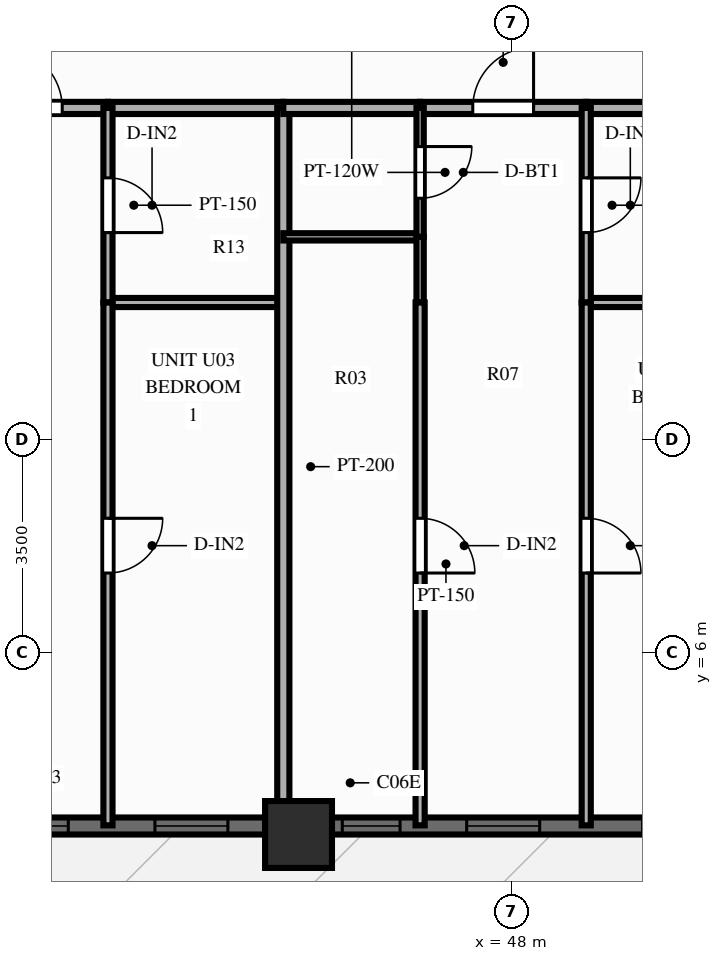
"""IFC4 building model, lengths in metres.
Left out: names, types, materials, properties, quantities, classifications, styles, units other than length and angle.
Written with IfcOpenShell. Run it as: python <this file> out.ifc"""

import sys

from ifc_helpers import new_model, si_unit, direction, frame, frame_2d, origin, origin_2d, place, context, subcontext, project, spatial, rectangle, extrude, source, transform, mapped, element, fill, save


model = new_model("IFC4")
c1 = context("Model", 3, precision=1e-05, world=origin(), true_north=direction((0.0, 1.0)))
c2 = subcontext(c1, "Body", "Model", "MODEL_VIEW")
j1 = project(units=[si_unit("LENGTHUNIT", "METRE"), si_unit("PLANEANGLEUNIT", "RADIAN")], contexts=[c1])
p1 = place(None, origin())
s1 = spatial("IfcSite", under=j1, at=p1, CompositionType="ELEMENT")
p2 = place(p1, origin())
s2 = spatial("IfcBuilding", under=s1, at=p2, CompositionType="ELEMENT")
p3 = place(p2, frame((0.0, 0.0, 61.4)))
s3 = spatial("IfcBuildingStorey", under=s2, at=p3, CompositionType="ELEMENT", Elevation=61.4)
m1 = source(origin(), c2, "Body", "SweptSolid", [
    extrude(rectangle(XDim=1.1, YDim=1.1, at=origin_2d()), origin(), (0.0, 0.0, 1.0), 3.0),
])
p4 = place(p3, frame((44.5, 3.0, 0.0), z_axis=(0.0, 0.0, 1.0), x_axis=(1.0, 0.0, 0.0)))
e1 = element("IfcColumn", 1, at=p4, inside=s3, PredefinedType="COLUMN", context=c2, shape_type="MappedRepresentation", body=[
    mapped(m1, transform((0.0, 0.0, 0.0), scale=1.0)),
])
p5 = place(p3, frame((15.5, 3.14, 0.0), z_axis=(0.0, 0.0, 1.0), x_axis=(1.0, 0.0, 0.0)))
e2 = element("IfcWall", 2, at=p5, inside=s3, PredefinedType="SOLIDWALL", context=c2, shape_type="SweptSolid", body=[
    extrude(rectangle(XDim=45.0, YDim=0.28, at=frame_2d((22.5, 0.0))), origin(), (0.0, 0.0, 1.0), 2.28),
])
p6 = place(p5, frame((1.426, 0.0, 0.25)))
e3 = element("IfcOpeningElement", 3, at=p6, cuts=e2, PredefinedType="OPENING", context=c2, shape_type="SweptSolid", body=[
    extrude(rectangle(XDim=1.2, YDim=1.5, at=frame_2d((0.6, 0.75))), frame((0.0, 0.152, 0.0), z_axis=(0.0, -1.0, 0.0), x_axis=(1.0, 0.0, 0.0)), (0.0, 0.0, 1.0), 0.304),
])
p7 = place(p5, frame((7.278, 0.0, 0.0), z_axis=(0.0, 0.0, 1.0), x_axis=(-1.0, 0.0, 0.0)))
e4 = element("IfcOpeningElement", 4, at=p7, cuts=e2, PredefinedType="OPENING", context=c2, shape_type="SweptSolid", body=[
    extrude(rectangle(XDim=1.1, YDim=2.15, at=frame_2d((0.55, 1.075))), frame((0.0, 0.152, 0.0), z_axis=(0.0, -1.0, 0.0), x_axis=(1.0, 0.0, 0.0)), (0.0, 0.0, 1.0), 0.304),
])
p8 = place(p5, frame((11.083, 0.0, 0.25)))
e5 = element("IfcOpeningElement", 5, at=p8, cuts=e2, PredefinedType="OPENING", context=c2, shape_type="SweptSolid", body=[
    extrude(rectangle(XDim=1.2, YDim=1.5, at=frame_2d((0.6, 0.75))), frame((0.0, 0.152, 0.0), z_axis=(0.0, -1.0, 0.0), x_axis=(1.0, 0.0, 0.0)), (0.0, 0.0, 1.0), 0.304),
])
p9 = place(p5, frame((13.991, 0.0, 0.25)))
e6 = element("IfcOpeningElement", 6, at=p9, cuts=e2, PredefinedType="OPENING", context=c2, shape_type="SweptSolid", body=[
    extrude(rectangle(XDim=1.2, YDim=1.5, at=frame_2d((0.6, 0.75))), frame((0.0, 0.152, 0.0), z_axis=(0.0, -1.0, 0.0), x_axis=(1.0, 0.0, 0.0)), (0.0, 0.0, 1.0), 0.304),
])
p10 = place(p5, frame((16.858, 0.0, 0.25)))
e7 = element("IfcOpeningElement", 7, at=p10, cuts=e2, PredefinedType="OPENING", context=c2, shape_type="SweptSolid", body=[
    extrude(rectangle(XDim=0.95, YDim=1.5, at=frame_2d((0.475, 0.75))), frame((0.0, 0.152, 0.0), z_axis=(0.0, -1.0, 0.0), x_axis=(1.0, 0.0, 0.0)), (0.0, 0.0, 1.0), 0.304),
])
p11 = place(p5, frame((19.119, 0.0, 0.25)))
e8 = element("IfcOpeningElement", 8, at=p11, cuts=e2, PredefinedType="OPENING", context=c2, shape_type="SweptSolid", body=[
    extrude(rectangle(XDim=1.2, YDim=1.5, at=frame_2d((0.6, 0.75))), frame((0.0, 0.152, 0.0), z_axis=(0.0, -1.0, 0.0), x_axis=(1.0, 0.0, 0.0)), (0.0, 0.0, 1.0), 0.304),
])
p12 = place(p5, frame((21.661, 0.0, 0.25)))
e9 = element("IfcOpeningElement", 9, at=p12, cuts=e2, PredefinedType="OPENING", context=c2, shape_type="SweptSolid", body=[
    extrude(rectangle(XDim=1.2, YDim=1.5, at=frame_2d((0.6, 0.75))), frame((0.0, 0.152, 0.0), z_axis=(0.0, -1.0, 0.0), x_axis=(1.0, 0.0, 0.0)), (0.0, 0.0, 1.0), 0.304),
])
p13 = place(p5, frame((24.013, 0.0, 0.25)))
e10 = element("IfcOpeningElement", 10, at=p13, cuts=e2, PredefinedType="OPENING", context=c2, shape_type="SweptSolid", body=[
    extrude(rectangle(XDim=1.2, YDim=1.5, at=frame_2d((0.6, 0.75))), frame((0.0, 0.152, 0.0), z_axis=(0.0, -1.0, 0.0), x_axis=(1.0, 0.0, 0.0)), (0.0, 0.0, 1.0), 0.304),
])
p14 = place(p5, frame((26.638, 0.0, 0.25)))
e11 = element("IfcOpeningElement", 11, at=p14, cuts=e2, PredefinedType="OPENING", context=c2, shape_type="SweptSolid", body=[
    extrude(rectangle(XDim=1.2, YDim=1.5, at=frame_2d((0.6, 0.75))), frame((0.0, 0.152, 0.0), z_axis=(0.0, -1.0, 0.0), x_axis=(1.0, 0.0, 0.0)), (0.0, 0.0, 1.0), 0.304),
])
p15 = place(p5, frame((29.72, 0.0, 0.25)))
e12 = element("IfcOpeningElement", 12, at=p15, cuts=e2, PredefinedType="OPENING", context=c2, shape_type="SweptSolid", body=[
    extrude(rectangle(XDim=0.95, YDim=1.5, at=frame_2d((0.475, 0.75))), frame((0.0, 0.152, 0.0), z_axis=(0.0, -1.0, 0.0), x_axis=(1.0, 0.0, 0.0)), (0.0, 0.0, 1.0), 0.304),
])
p16 = place(p5, frame((31.765, 0.0, 0.25)))
e13 = element("IfcOpeningElement", 13, at=p16, cuts=e2, PredefinedType="OPENING", context=c2, shape_type="SweptSolid", body=[
    extrude(rectangle(XDim=1.2, YDim=1.5, at=frame_2d((0.6, 0.75))), frame((0.0, 0.152, 0.0), z_axis=(0.0, -1.0, 0.0), x_axis=(1.0, 0.0, 0.0)), (0.0, 0.0, 1.0), 0.304),
])
p17 = place(p5, frame((34.658, 0.0, 0.25)))
e14 = element("IfcOpeningElement", 14, at=p17, cuts=e2, PredefinedType="OPENING", context=c2, shape_type="SweptSolid", body=[
    extrude(rectangle(XDim=1.2, YDim=1.5, at=frame_2d((0.6, 0.75))), frame((0.0, 0.152, 0.0), z_axis=(0.0, -1.0, 0.0), x_axis=(1.0, 0.0, 0.0)), (0.0, 0.0, 1.0), 0.304),
])
p18 = place(p5, frame((37.31, 0.0, 0.25)))
e15 = element("IfcOpeningElement", 15, at=p18, cuts=e2, PredefinedType="OPENING", context=c2, shape_type="SweptSolid", body=[
    extrude(rectangle(XDim=1.2, YDim=1.5, at=frame_2d((0.6, 0.75))), frame((0.0, 0.152, 0.0), z_axis=(0.0, -1.0, 0.0), x_axis=(1.0, 0.0, 0.0)), (0.0, 0.0, 1.0), 0.304),
])
p19 = place(p5, frame((39.801, 0.0, 0.25)))
e16 = element("IfcOpeningElement", 16, at=p19, cuts=e2, PredefinedType="OPENING", context=c2, shape_type="SweptSolid", body=[
    extrude(rectangle(XDim=1.2, YDim=1.5, at=frame_2d((0.6, 0.75))), frame((0.0, 0.152, 0.0), z_axis=(0.0, -1.0, 0.0), x_axis=(1.0, 0.0, 0.0)), (0.0, 0.0, 1.0), 0.304),
])
p20 = place(p5, frame((42.588, 0.0, 0.25)))
e17 = element("IfcOpeningElement", 17, at=p20, cuts=e2, PredefinedType="OPENING", context=c2, shape_type="SweptSolid", body=[
    extrude(rectangle(XDim=1.2, YDim=1.5, at=frame_2d((0.6, 0.75))), frame((0.0, 0.152, 0.0), z_axis=(0.0, -1.0, 0.0), x_axis=(1.0, 0.0, 0.0)), (0.0, 0.0, 1.0), 0.304),
])
p21 = place(p3, frame((38.861, 14.95, 0.0), z_axis=(0.0, 0.0, 1.0), x_axis=(1.0, 0.0, 0.0)))
e18 = element("IfcWall", 18, at=p21, inside=s3, PredefinedType="PARTITIONING", context=c2, shape_type="SweptSolid", body=[
    extrude(rectangle(XDim=2.505, YDim=0.2, at=frame_2d((1.252, 0.0))), origin(), (0.0, 0.0, 1.0), 2.79),
])
p22 = place(p21, frame((0.753, 0.0, 0.0)))
e19 = element("IfcOpeningElement", 19, at=p22, cuts=e18, PredefinedType="OPENING", context=c2, shape_type="SweptSolid", body=[
    extrude(rectangle(XDim=1.0, YDim=2.15, at=frame_2d((0.5, 1.075))), frame((0.0, 0.112, 0.0), z_axis=(0.0, -1.0, 0.0), x_axis=(1.0, 0.0, 0.0)), (0.0, 0.0, 1.0), 0.224),
])
p23 = place(p3, frame((41.366, 14.95, 0.0), z_axis=(0.0, 0.0, 1.0), x_axis=(1.0, 0.0, 0.0)))
e20 = element("IfcWall", 20, at=p23, inside=s3, PredefinedType="PARTITIONING", context=c2, shape_type="SweptSolid", body=[
    extrude(rectangle(XDim=2.884, YDim=0.2, at=frame_2d((1.442, 0.0))), origin(), (0.0, 0.0, 1.0), 2.79),
])
p24 = place(p3, frame((41.366, 11.75, 0.0), z_axis=(0.0, 0.0, 1.0), x_axis=(1.0, 0.0, 0.0)))
e21 = element("IfcWall", 21, at=p24, inside=s3, PredefinedType="PARTITIONING", context=c2, shape_type="SweptSolid", body=[
    extrude(rectangle(XDim=2.884, YDim=0.15, at=frame_2d((1.442, 0.0))), origin(), (0.0, 0.0, 1.0), 2.79),
])
p25 = place(p3, frame((41.366, 14.95, 0.0), z_axis=(0.0, 0.0, 1.0), x_axis=(0.0, -1.0, 0.0)))
e22 = element("IfcWall", 22, at=p25, inside=s3, PredefinedType="PARTITIONING", context=c2, shape_type="SweptSolid", body=[
    extrude(rectangle(XDim=3.2, YDim=0.15, at=frame_2d((1.6, 0.0))), origin(), (0.0, 0.0, 1.0), 2.79),
])
p26 = place(p25, frame((1.15, 0.0, 0.0)))
e23 = element("IfcOpeningElement", 23, at=p26, cuts=e22, PredefinedType="OPENING", context=c2, shape_type="SweptSolid", body=[
    extrude(rectangle(XDim=0.9, YDim=2.1, at=frame_2d((0.45, 1.05))), frame((0.0, 0.087, 0.0), z_axis=(0.0, -1.0, 0.0), x_axis=(1.0, 0.0, 0.0)), (0.0, 0.0, 1.0), 0.174),
])
p27 = place(p3, frame((41.366, 11.75, 0.0), z_axis=(0.0, 0.0, 1.0), x_axis=(0.0, -1.0, 0.0)))
e24 = element("IfcWall", 24, at=p27, inside=s3, PredefinedType="PARTITIONING", context=c2, shape_type="SweptSolid", body=[
    extrude(rectangle(XDim=8.6, YDim=0.15, at=frame_2d((4.3, 0.0))), origin(), (0.0, 0.0, 1.0), 2.79),
])
p28 = place(p27, frame((3.549, 0.0, 0.0)))
e25 = element("IfcOpeningElement", 25, at=p28, cuts=e24, PredefinedType="OPENING", context=c2, shape_type="SweptSolid", body=[
    extrude(rectangle(XDim=0.9, YDim=2.1, at=frame_2d((0.45, 1.05))), frame((0.0, 0.087, 0.0), z_axis=(0.0, -1.0, 0.0), x_axis=(1.0, 0.0, 0.0)), (0.0, 0.0, 1.0), 0.174),
])
p29 = place(p3, frame((44.25, 14.95, 0.0), z_axis=(0.0, 0.0, 1.0), x_axis=(0.0, -1.0, 0.0)))
e26 = element("IfcWall", 26, at=p29, inside=s3, PredefinedType="PARTITIONING", context=c2, shape_type="SweptSolid", body=[
    extrude(rectangle(XDim=11.8, YDim=0.2, at=frame_2d((5.9, 0.0))), origin(), (0.0, 0.0, 1.0), 2.79),
])
p30 = place(p3, frame((44.25, 14.95, 0.0), z_axis=(0.0, 0.0, 1.0), x_axis=(1.0, 0.0, 0.0)))
e27 = element("IfcWall", 27, at=p30, inside=s3, PredefinedType="PARTITIONING", context=c2, shape_type="SweptSolid", body=[
    extrude(rectangle(XDim=2.25, YDim=0.2, at=frame_2d((1.125, 0.0))), origin(), (0.0, 0.0, 1.0), 2.79),
])
p31 = place(p3, frame((46.5, 14.95, 0.0), z_axis=(0.0, 0.0, 1.0), x_axis=(1.0, 0.0, 0.0)))
e28 = element("IfcWall", 28, at=p31, inside=s3, PredefinedType="PARTITIONING", context=c2, shape_type="SweptSolid", body=[
    extrude(rectangle(XDim=2.732, YDim=0.2, at=frame_2d((1.366, 0.0))), origin(), (0.0, 0.0, 1.0), 2.79),
])
p32 = place(p31, frame((0.866, 0.0, 0.0)))
e29 = element("IfcOpeningElement", 29, at=p32, cuts=e28, PredefinedType="OPENING", context=c2, shape_type="SweptSolid", body=[
    extrude(rectangle(XDim=1.0, YDim=2.15, at=frame_2d((0.5, 1.075))), frame((0.0, 0.112, 0.0), z_axis=(0.0, -1.0, 0.0), x_axis=(1.0, 0.0, 0.0)), (0.0, 0.0, 1.0), 0.224),
])
p33 = place(p3, frame((49.231, 14.95, 0.0), z_axis=(0.0, 0.0, 1.0), x_axis=(1.0, 0.0, 0.0)))
e30 = element("IfcWall", 30, at=p33, inside=s3, PredefinedType="PARTITIONING", context=c2, shape_type="SweptSolid", body=[
    extrude(rectangle(XDim=3.053, YDim=0.2, at=frame_2d((1.527, 0.0))), origin(), (0.0, 0.0, 1.0), 2.79),
])
p34 = place(p3, frame((44.25, 12.83, 0.0), z_axis=(0.0, 0.0, 1.0), x_axis=(1.0, 0.0, 0.0)))
e31 = element("IfcWall", 31, at=p34, inside=s3, PredefinedType="PARTITIONING", context=c2, shape_type="SweptSolid", body=[
    extrude(rectangle(XDim=2.25, YDim=0.12, at=frame_2d((1.125, 0.0))), origin(), (0.0, 0.0, 1.0), 2.79),
])
p35 = place(p3, frame((49.231, 11.75, 0.0), z_axis=(0.0, 0.0, 1.0), x_axis=(1.0, 0.0, 0.0)))
e32 = element("IfcWall", 32, at=p35, inside=s3, PredefinedType="PARTITIONING", context=c2, shape_type="SweptSolid", body=[
    extrude(rectangle(XDim=3.053, YDim=0.15, at=frame_2d((1.527, 0.0))), origin(), (0.0, 0.0, 1.0), 2.79),
])
p36 = place(p3, frame((46.5, 14.95, 0.0), z_axis=(0.0, 0.0, 1.0), x_axis=(0.0, -1.0, 0.0)))
e33 = element("IfcWall", 33, at=p36, inside=s3, PredefinedType="PARTITIONING", context=c2, shape_type="SweptSolid", body=[
    extrude(rectangle(XDim=2.12, YDim=0.12, at=frame_2d((1.06, 0.0))), origin(), (0.0, 0.0, 1.0), 2.79),
])
p37 = place(p36, frame((0.635, 0.0, 0.0)))
e34 = element("IfcOpeningElement", 34, at=p37, cuts=e33, PredefinedType="OPENING", context=c2, shape_type="SweptSolid", body=[
    extrude(rectangle(XDim=0.85, YDim=2.05, at=frame_2d((0.425, 1.025))), frame((0.0, 0.072, 0.0), z_axis=(0.0, -1.0, 0.0), x_axis=(1.0, 0.0, 0.0)), (0.0, 0.0, 1.0), 0.144),
])
p38 = place(p3, frame((46.5, 12.83, 0.0), z_axis=(0.0, 0.0, 1.0), x_axis=(0.0, -1.0, 0.0)))
e35 = element("IfcWall", 35, at=p38, inside=s3, PredefinedType="PARTITIONING", context=c2, shape_type="SweptSolid", body=[
    extrude(rectangle(XDim=1.08, YDim=0.12, at=frame_2d((0.54, 0.0))), origin(), (0.0, 0.0, 1.0), 2.79),
])
p39 = place(p3, frame((46.5, 11.75, 0.0), z_axis=(0.0, 0.0, 1.0), x_axis=(0.0, -1.0, 0.0)))
e36 = element("IfcWall", 36, at=p39, inside=s3, PredefinedType="PARTITIONING", context=c2, shape_type="SweptSolid", body=[
    extrude(rectangle(XDim=8.6, YDim=0.15, at=frame_2d((4.3, 0.0))), origin(), (0.0, 0.0, 1.0), 2.79),
])
p40 = place(p39, frame((3.549, 0.0, 0.0)))
e37 = element("IfcOpeningElement", 37, at=p40, cuts=e36, PredefinedType="OPENING", context=c2, shape_type="SweptSolid", body=[
    extrude(rectangle(XDim=0.9, YDim=2.1, at=frame_2d((0.45, 1.05))), frame((0.0, 0.087, 0.0), z_axis=(0.0, -1.0, 0.0), x_axis=(1.0, 0.0, 0.0)), (0.0, 0.0, 1.0), 0.174),
])
p41 = place(p3, frame((49.231, 14.95, 0.0), z_axis=(0.0, 0.0, 1.0), x_axis=(0.0, -1.0, 0.0)))
e38 = element("IfcWall", 38, at=p41, inside=s3, PredefinedType="PARTITIONING", context=c2, shape_type="SweptSolid", body=[
    extrude(rectangle(XDim=3.2, YDim=0.15, at=frame_2d((1.6, 0.0))), origin(), (0.0, 0.0, 1.0), 2.79),
])
p42 = place(p41, frame((1.15, 0.0, 0.0)))
e39 = element("IfcOpeningElement", 39, at=p42, cuts=e38, PredefinedType="OPENING", context=c2, shape_type="SweptSolid", body=[
    extrude(rectangle(XDim=0.9, YDim=2.1, at=frame_2d((0.45, 1.05))), frame((0.0, 0.087, 0.0), z_axis=(0.0, -1.0, 0.0), x_axis=(1.0, 0.0, 0.0)), (0.0, 0.0, 1.0), 0.174),
])
p43 = place(p3, frame((49.231, 11.75, 0.0), z_axis=(0.0, 0.0, 1.0), x_axis=(0.0, -1.0, 0.0)))
e40 = element("IfcWall", 40, at=p43, inside=s3, PredefinedType="PARTITIONING", context=c2, shape_type="SweptSolid", body=[
    extrude(rectangle(XDim=8.6, YDim=0.15, at=frame_2d((4.3, 0.0))), origin(), (0.0, 0.0, 1.0), 2.79),
])
p44 = place(p43, frame((3.549, 0.0, 0.0)))
e41 = element("IfcOpeningElement", 41, at=p44, cuts=e40, PredefinedType="OPENING", context=c2, shape_type="SweptSolid", body=[
    extrude(rectangle(XDim=0.9, YDim=2.1, at=frame_2d((0.45, 1.05))), frame((0.0, 0.087, 0.0), z_axis=(0.0, -1.0, 0.0), x_axis=(1.0, 0.0, 0.0)), (0.0, 0.0, 1.0), 0.174),
])
m2 = source(origin(), c2, "Body", "SweptSolid", [
    extrude(rectangle(XDim=1.2, YDim=1.5, at=frame_2d((0.6, 0.75))), frame((0.0, 0.03, 0.0), z_axis=(0.0, -1.0, 0.0), x_axis=(1.0, 0.0, 0.0)), (0.0, 0.0, 1.0), 0.06),
])
p45 = place(p13, origin())
e42 = element("IfcWindow", 42, at=p45, inside=s3, PartitioningType="SINGLE_PANEL", PredefinedType="WINDOW", context=c2, shape_type="MappedRepresentation", body=[
    mapped(m2, transform((0.0, 0.0, 0.0), scale=1.0)),
])
fill(e10, e42)
p46 = place(p14, origin())
e43 = element("IfcWindow", 43, at=p46, inside=s3, PartitioningType="SINGLE_PANEL", PredefinedType="WINDOW", context=c2, shape_type="MappedRepresentation", body=[
    mapped(m2, transform((0.0, 0.0, 0.0), scale=1.0)),
])
fill(e11, e43)
m3 = source(origin(), c2, "Body", "SweptSolid", [
    extrude(rectangle(XDim=0.95, YDim=1.5, at=frame_2d((0.475, 0.75))), frame((0.0, 0.03, 0.0), z_axis=(0.0, -1.0, 0.0), x_axis=(1.0, 0.0, 0.0)), (0.0, 0.0, 1.0), 0.06),
])
p47 = place(p15, origin())
e44 = element("IfcWindow", 44, at=p47, inside=s3, PartitioningType="SINGLE_PANEL", PredefinedType="WINDOW", context=c2, shape_type="MappedRepresentation", body=[
    mapped(m3, transform((0.0, 0.0, 0.0), scale=1.0)),
])
fill(e12, e44)
p48 = place(p16, origin())
e45 = element("IfcWindow", 45, at=p48, inside=s3, PartitioningType="SINGLE_PANEL", PredefinedType="WINDOW", context=c2, shape_type="MappedRepresentation", body=[
    mapped(m2, transform((0.0, 0.0, 0.0), scale=1.0)),
])
fill(e13, e45)
m4 = source(origin(), c2, "Body", "SweptSolid", [
    extrude(rectangle(XDim=1.0, YDim=2.15, at=frame_2d((0.5, 1.075))), frame((0.0, 0.025, 0.0), z_axis=(0.0, -1.0, 0.0), x_axis=(1.0, 0.0, 0.0)), (0.0, 0.0, 1.0), 0.05),
])
p49 = place(p22, origin())
e46 = element("IfcDoor", 46, at=p49, inside=s3, OperationType="SINGLE_SWING_LEFT", PredefinedType="DOOR", context=c2, shape_type="MappedRepresentation", body=[
    mapped(m4, transform((0.0, 0.0, 0.0), scale=1.0)),
])
fill(e19, e46)
m5 = source(origin(), c2, "Body", "SweptSolid", [
    extrude(rectangle(XDim=0.9, YDim=2.1, at=frame_2d((0.45, 1.05))), frame((0.0, 0.025, 0.0), z_axis=(0.0, -1.0, 0.0), x_axis=(1.0, 0.0, 0.0)), (0.0, 0.0, 1.0), 0.05),
])
p50 = place(p26, origin())
e47 = element("IfcDoor", 47, at=p50, inside=s3, OperationType="SINGLE_SWING_RIGHT", PredefinedType="DOOR", context=c2, shape_type="MappedRepresentation", body=[
    mapped(m5, transform((0.0, 0.0, 0.0), scale=1.0)),
])
fill(e23, e47)
p51 = place(p28, origin())
e48 = element("IfcDoor", 48, at=p51, inside=s3, OperationType="SINGLE_SWING_LEFT", PredefinedType="DOOR", context=c2, shape_type="MappedRepresentation", body=[
    mapped(m5, transform((0.0, 0.0, 0.0), scale=1.0)),
])
fill(e25, e48)
p52 = place(p32, origin())
e49 = element("IfcDoor", 49, at=p52, inside=s3, OperationType="SINGLE_SWING_RIGHT", PredefinedType="DOOR", context=c2, shape_type="MappedRepresentation", body=[
    mapped(m4, transform((0.0, 0.0, 0.0), scale=1.0)),
])
fill(e29, e49)
m6 = source(origin(), c2, "Body", "SweptSolid", [
    extrude(rectangle(XDim=0.85, YDim=2.05, at=frame_2d((0.425, 1.025))), frame((0.0, 0.025, 0.0), z_axis=(0.0, -1.0, 0.0), x_axis=(1.0, 0.0, 0.0)), (0.0, 0.0, 1.0), 0.05),
])
p53 = place(p37, origin())
e50 = element("IfcDoor", 50, at=p53, inside=s3, OperationType="SINGLE_SWING_LEFT", PredefinedType="DOOR", context=c2, shape_type="MappedRepresentation", body=[
    mapped(m6, transform((0.0, 0.0, 0.0), scale=1.0)),
])
fill(e34, e50)
p54 = place(p40, origin())
e51 = element("IfcDoor", 51, at=p54, inside=s3, OperationType="SINGLE_SWING_RIGHT", PredefinedType="DOOR", context=c2, shape_type="MappedRepresentation", body=[
    mapped(m5, transform((0.0, 0.0, 0.0), scale=1.0)),
])
fill(e37, e51)
p55 = place(p42, origin())
e52 = element("IfcDoor", 52, at=p55, inside=s3, OperationType="SINGLE_SWING_LEFT", PredefinedType="DOOR", context=c2, shape_type="MappedRepresentation", body=[
    mapped(m5, transform((0.0, 0.0, 0.0), scale=1.0)),
])
fill(e39, e52)
p56 = place(p44, origin())
e53 = element("IfcDoor", 53, at=p56, inside=s3, OperationType="SINGLE_SWING_RIGHT", PredefinedType="DOOR", context=c2, shape_type="MappedRepresentation", body=[
    mapped(m5, transform((0.0, 0.0, 0.0), scale=1.0)),
])
fill(e41, e53)
save(model, sys.argv[1])
